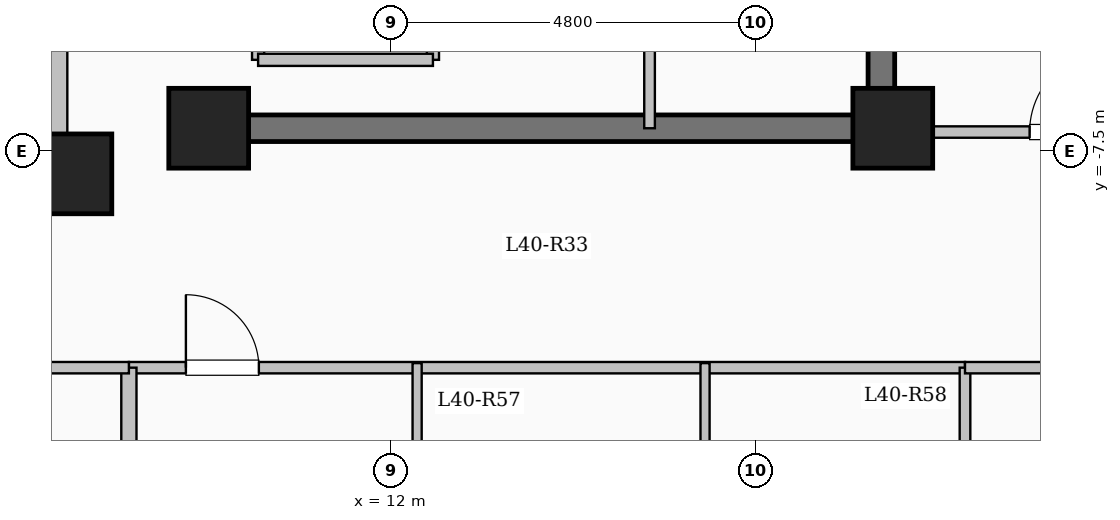
"""IFC4 building model, lengths in metres.
Left out: names, types, materials, properties, quantities, classifications, styles, units other than length and angle.
Written with IfcOpenShell. Run it as: python <this file> out.ifc"""

import sys

from ifc_helpers import new_model, si_unit, direction, frame, frame_2d, origin, origin_2d, place, context, subcontext, project, spatial, rectangle, extrude, element, fill, save


model = new_model("IFC4")
c1 = context("Model", 3, precision=1e-05, world=origin(), true_north=direction((0.0, 1.0)))
c2 = subcontext(c1, "Body", "Model", "MODEL_VIEW")
j1 = project(units=[si_unit("LENGTHUNIT", "METRE"), si_unit("PLANEANGLEUNIT", "RADIAN")], contexts=[c1])
p1 = place(None, origin())
s1 = spatial("IfcSite", under=j1, at=p1, CompositionType="ELEMENT")
p2 = place(p1, origin())
s2 = spatial("IfcBuilding", under=s1, at=p2, CompositionType="ELEMENT")
p3 = place(p2, frame((0.0, 0.0, 149.35)))
s3 = spatial("IfcBuildingStorey", under=s2, at=p3, CompositionType="ELEMENT", Elevation=149.35)
for number, where, z_axis, x_axis in (
    (1, (7.8, -7.8, 0.0), (0.0, 0.0, 1.0), (1.0, 0.0, 0.0)),
    (2, (9.6, -7.2, 0.0), (0.0, 0.0, 1.0), (1.0, 0.0, 0.0)),
    (3, (18.6, -7.2, 0.0), (0.0, 0.0, 1.0), (1.0, 0.0, 0.0)),
):
    element("IfcColumn", number, at=place(p3, frame(where, z_axis=z_axis, x_axis=x_axis)), inside=s3, PredefinedType="COLUMN", context=c2, shape_type="SweptSolid", body=[
        extrude(rectangle(XDim=1.05, YDim=1.05, at=origin_2d()), origin(), (0.0, 0.0, 1.0), 3.35),
    ])
p4 = place(p3, frame((-7.62, -7.62, 0.0), z_axis=(0.0, 0.0, 1.0), x_axis=(1.0, 0.0, 0.0)))
e4 = element("IfcWall", 4, at=p4, inside=s3, PredefinedType="SOLIDWALL", context=c2, shape_type="SweptSolid", body=[
    extrude(rectangle(XDim=15.24, YDim=0.24, at=frame_2d((7.62, 0.0))), origin(), (0.0, 0.0, 1.0), 3.1),
])
p5 = place(p4, frame((6.92, 0.0, 0.95)))
e5 = element("IfcOpeningElement", 5, at=p5, cuts=e4, PredefinedType="OPENING", context=c2, shape_type="SweptSolid", body=[
    extrude(rectangle(XDim=1.4, YDim=1.5, at=frame_2d((0.7, 0.75))), frame((0.0, 0.13, 0.0), z_axis=(0.0, -1.0, 0.0), x_axis=(1.0, 0.0, 0.0)), (0.0, 0.0, 1.0), 0.26),
])
p6 = place(p3, frame((7.62, -7.62, 0.0), z_axis=(0.0, 0.0, 1.0), x_axis=(0.0, 1.0, 0.0)))
e6 = element("IfcWall", 6, at=p6, inside=s3, PredefinedType="SOLIDWALL", context=c2, shape_type="SweptSolid", body=[
    extrude(rectangle(XDim=15.24, YDim=0.24, at=frame_2d((7.62, 0.0))), origin(), (0.0, 0.0, 1.0), 3.1),
])
p7 = place(p6, frame((6.92, 0.0, 0.95)))
e7 = element("IfcOpeningElement", 7, at=p7, cuts=e6, PredefinedType="OPENING", context=c2, shape_type="SweptSolid", body=[
    extrude(rectangle(XDim=1.4, YDim=1.5, at=frame_2d((0.7, 0.75))), frame((0.0, 0.13, 0.0), z_axis=(0.0, -1.0, 0.0), x_axis=(1.0, 0.0, 0.0)), (0.0, 0.0, 1.0), 0.26),
])
p8 = place(p3, frame((10.25, -6.3, 0.0), z_axis=(0.0, 0.0, 1.0), x_axis=(0.0, 1.0, 0.0)))
e8 = element("IfcWall", 8, at=p8, inside=s3, PredefinedType="SOLIDWALL", context=c2, shape_type="SweptSolid", body=[
    extrude(rectangle(XDim=2.6, YDim=0.16, at=frame_2d((1.3, 0.0))), origin(), (0.0, 0.0, 1.0), 3.1),
])
p9 = place(p8, frame((0.75, 0.0, 0.0)))
e9 = element("IfcOpeningElement", 9, at=p9, cuts=e8, PredefinedType="OPENING", context=c2, shape_type="SweptSolid", body=[
    extrude(rectangle(XDim=1.1, YDim=2.15, at=frame_2d((0.55, 1.075))), frame((0.0, 0.09, 0.0), z_axis=(0.0, -1.0, 0.0), x_axis=(1.0, 0.0, 0.0)), (0.0, 0.0, 1.0), 0.18),
])
p10 = place(p3, frame((12.55, -6.3, 0.0), z_axis=(0.0, 0.0, 1.0), x_axis=(0.0, 1.0, 0.0)))
e10 = element("IfcWall", 10, at=p10, inside=s3, PredefinedType="SOLIDWALL", context=c2, shape_type="SweptSolid", body=[
    extrude(rectangle(XDim=2.6, YDim=0.16, at=frame_2d((1.3, 0.0))), origin(), (0.0, 0.0, 1.0), 3.1),
])
p11 = place(p3, frame((10.25, -6.3, 0.0), z_axis=(0.0, 0.0, 1.0), x_axis=(1.0, 0.0, 0.0)))
e11 = element("IfcWall", 11, at=p11, inside=s3, PredefinedType="SOLIDWALL", context=c2, shape_type="SweptSolid", body=[
    extrude(rectangle(XDim=2.3, YDim=0.16, at=frame_2d((1.15, 0.0))), origin(), (0.0, 0.0, 1.0), 3.1),
])
p12 = place(p3, frame((18.45, -7.375, 0.0), z_axis=(0.0, 0.0, 1.0), x_axis=(0.0, 1.0, 0.0)))
e12 = element("IfcWall", 12, at=p12, inside=s3, PredefinedType="SHEAR", context=c2, shape_type="SweptSolid", body=[
    extrude(rectangle(XDim=14.05, YDim=0.35, at=frame_2d((7.025, 0.0))), origin(), (0.0, 0.0, 1.0), 3.35),
])
p13 = place(p3, frame((10.075, -7.2, 0.0), z_axis=(0.0, 0.0, 1.0), x_axis=(1.0, 0.0, 0.0)))
e13 = element("IfcWall", 13, at=p13, inside=s3, PredefinedType="SHEAR", context=c2, shape_type="SweptSolid", body=[
    extrude(rectangle(XDim=8.55, YDim=0.35, at=frame_2d((4.275, 0.0))), origin(), (0.0, 0.0, 1.0), 3.35),
])
p14 = place(p3, frame((15.4, -7.2, 0.0), z_axis=(0.0, 0.0, 1.0), x_axis=(0.0, 1.0, 0.0)))
e14 = element("IfcWall", 14, at=p14, inside=s3, PredefinedType="PARTITIONING", context=c2, shape_type="SweptSolid", body=[
    extrude(rectangle(XDim=10.45, YDim=0.14, at=frame_2d((5.225, 0.0))), origin(), (0.0, 0.0, 1.0), 3.1),
])
p15 = place(p14, frame((9.25, 0.0, 0.0)))
e15 = element("IfcOpeningElement", 15, at=p15, cuts=e14, PredefinedType="OPENING", context=c2, shape_type="SweptSolid", body=[
    extrude(rectangle(XDim=0.9, YDim=2.08, at=frame_2d((0.45, 1.04))), frame((0.0, 0.08, 0.0), z_axis=(0.0, -1.0, 0.0), x_axis=(1.0, 0.0, 0.0)), (0.0, 0.0, 1.0), 0.16),
])
p16 = place(p3, frame((8.55, -10.35, 0.0), z_axis=(0.0, 0.0, 1.0), x_axis=(1.0, 0.0, 0.0)))
e16 = element("IfcWall", 16, at=p16, inside=s3, PredefinedType="PARTITIONING", context=c2, shape_type="SweptSolid", body=[
    extrude(rectangle(XDim=11.0, YDim=0.15, at=frame_2d((5.5, 0.0))), origin(), (0.0, 0.0, 1.0), 3.1),
])
p17 = place(p16, frame((0.75, 0.0, 0.0)))
e17 = element("IfcOpeningElement", 17, at=p17, cuts=e16, PredefinedType="OPENING", context=c2, shape_type="SweptSolid", body=[
    extrude(rectangle(XDim=0.96, YDim=2.15, at=frame_2d((0.48, 1.075))), frame((0.0, 0.085, 0.0), z_axis=(0.0, -1.0, 0.0), x_axis=(1.0, 0.0, 0.0)), (0.0, 0.0, 1.0), 0.17),
])
p18 = place(p3, frame((12.342, -21.2, 0.0), z_axis=(0.0, 0.0, 1.0), x_axis=(0.0, 1.0, 0.0)))
e18 = element("IfcWall", 18, at=p18, inside=s3, PredefinedType="PARTITIONING", context=c2, shape_type="SweptSolid", body=[
    extrude(rectangle(XDim=10.91, YDim=0.12, at=frame_2d((5.455, 0.0))), origin(), (0.0, 0.0, 1.0), 3.1),
])
p19 = place(p18, frame((7.085, 0.0, 0.0)))
e19 = element("IfcOpeningElement", 19, at=p19, cuts=e18, PredefinedType="OPENING", context=c2, shape_type="SweptSolid", body=[
    extrude(rectangle(XDim=1.08, YDim=2.15, at=frame_2d((0.54, 1.075))), frame((0.0, 0.07, 0.0), z_axis=(0.0, -1.0, 0.0), x_axis=(1.0, 0.0, 0.0)), (0.0, 0.0, 1.0), 0.14),
])
p20 = place(p3, frame((16.13, -12.75, 0.0), z_axis=(0.0, 0.0, 1.0), x_axis=(0.0, 1.0, 0.0)))
e20 = element("IfcWall", 20, at=p20, inside=s3, PredefinedType="PARTITIONING", context=c2, shape_type="SweptSolid", body=[
    extrude(rectangle(XDim=2.46, YDim=0.12, at=frame_2d((1.23, 0.0))), origin(), (0.0, 0.0, 1.0), 3.1),
])
p21 = place(p3, frame((8.55, -21.804, 0.0), z_axis=(0.0, 0.0, 1.0), x_axis=(0.0, 1.0, 0.0)))
e21 = element("IfcWall", 21, at=p21, inside=s3, PredefinedType="SOLIDWALL", context=c2, shape_type="SweptSolid", body=[
    extrude(rectangle(XDim=11.454, YDim=0.2, at=frame_2d((5.727, 0.0))), origin(), (0.0, 0.0, 1.0), 3.1),
])
p22 = place(p3, frame((-8.55, -10.35, 0.0), z_axis=(0.0, 0.0, 1.0), x_axis=(1.0, 0.0, 0.0)))
e22 = element("IfcWall", 22, at=p22, inside=s3, PredefinedType="PARTITIONING", context=c2, shape_type="SweptSolid", body=[
    extrude(rectangle(XDim=17.1, YDim=0.15, at=frame_2d((8.55, 0.0))), origin(), (0.0, 0.0, 1.0), 3.1),
])
p23 = place(p22, frame((1.6, 0.0, 0.0)))
e23 = element("IfcOpeningElement", 23, at=p23, cuts=e22, PredefinedType="OPENING", context=c2, shape_type="SweptSolid", body=[
    extrude(rectangle(XDim=0.96, YDim=2.15, at=frame_2d((0.48, 1.075))), frame((0.0, 0.085, 0.0), z_axis=(0.0, -1.0, 0.0), x_axis=(1.0, 0.0, 0.0)), (0.0, 0.0, 1.0), 0.17),
])
p24 = place(p3, frame((18.45, -7.25, 0.0), z_axis=(0.0, 0.0, 1.0), x_axis=(1.0, 0.0, 0.0)))
e24 = element("IfcWall", 24, at=p24, inside=s3, PredefinedType="PARTITIONING", context=c2, shape_type="SweptSolid", body=[
    extrude(rectangle(XDim=6.63, YDim=0.15, at=frame_2d((3.315, 0.0))), origin(), (0.0, 0.0, 1.0), 3.1),
])
p25 = place(p24, frame((1.95, 0.0, 0.0)))
e25 = element("IfcOpeningElement", 25, at=p25, cuts=e24, PredefinedType="OPENING", context=c2, shape_type="SweptSolid", body=[
    extrude(rectangle(XDim=1.08, YDim=2.15, at=frame_2d((0.54, 1.075))), frame((0.0, 0.085, 0.0), z_axis=(0.0, -1.0, 0.0), x_axis=(1.0, 0.0, 0.0)), (0.0, 0.0, 1.0), 0.17),
])
p26 = place(p3, frame((19.55, -17.25, 0.0), z_axis=(0.0, 0.0, 1.0), x_axis=(0.0, 1.0, 0.0)))
e26 = element("IfcWall", 26, at=p26, inside=s3, PredefinedType="PARTITIONING", context=c2, shape_type="SweptSolid", body=[
    extrude(rectangle(XDim=6.9, YDim=0.14, at=frame_2d((3.45, 0.0))), origin(), (0.0, 0.0, 1.0), 3.1),
])
p27 = place(p3, frame((19.55, -10.35, 0.0), z_axis=(0.0, 0.0, 1.0), x_axis=(1.0, 0.0, 0.0)))
e27 = element("IfcWall", 27, at=p27, inside=s3, PredefinedType="PARTITIONING", context=c2, shape_type="SweptSolid", body=[
    extrude(rectangle(XDim=5.53, YDim=0.15, at=frame_2d((2.765, 0.0))), origin(), (0.0, 0.0, 1.0), 3.1),
])
p28 = place(p27, frame((2.29, 0.0, 0.0)))
e28 = element("IfcOpeningElement", 28, at=p28, cuts=e27, PredefinedType="OPENING", context=c2, shape_type="SweptSolid", body=[
    extrude(rectangle(XDim=0.95, YDim=2.15, at=frame_2d((0.475, 1.075))), frame((0.0, 0.085, 0.0), z_axis=(0.0, -1.0, 0.0), x_axis=(1.0, 0.0, 0.0)), (0.0, 0.0, 1.0), 0.17),
])
p29 = place(p17, origin())
e29 = element("IfcDoor", 29, at=p29, inside=s3, OperationType="SINGLE_SWING_LEFT", PredefinedType="DOOR", context=c2, shape_type="SweptSolid", body=[
    extrude(rectangle(XDim=0.96, YDim=2.15, at=frame_2d((0.48, 1.075))), frame((0.0, 0.025, 0.0), z_axis=(0.0, -1.0, 0.0), x_axis=(1.0, 0.0, 0.0)), (0.0, 0.0, 1.0), 0.05),
])
fill(e17, e29)
p30 = place(p25, origin())
e30 = element("IfcDoor", 30, at=p30, inside=s3, OperationType="SINGLE_SWING_RIGHT", PredefinedType="DOOR", context=c2, shape_type="SweptSolid", body=[
    extrude(rectangle(XDim=1.08, YDim=2.15, at=frame_2d((0.54, 1.075))), frame((0.0, 0.025, 0.0), z_axis=(0.0, -1.0, 0.0), x_axis=(1.0, 0.0, 0.0)), (0.0, 0.0, 1.0), 0.05),
])
fill(e25, e30)
save(model, sys.argv[1])
